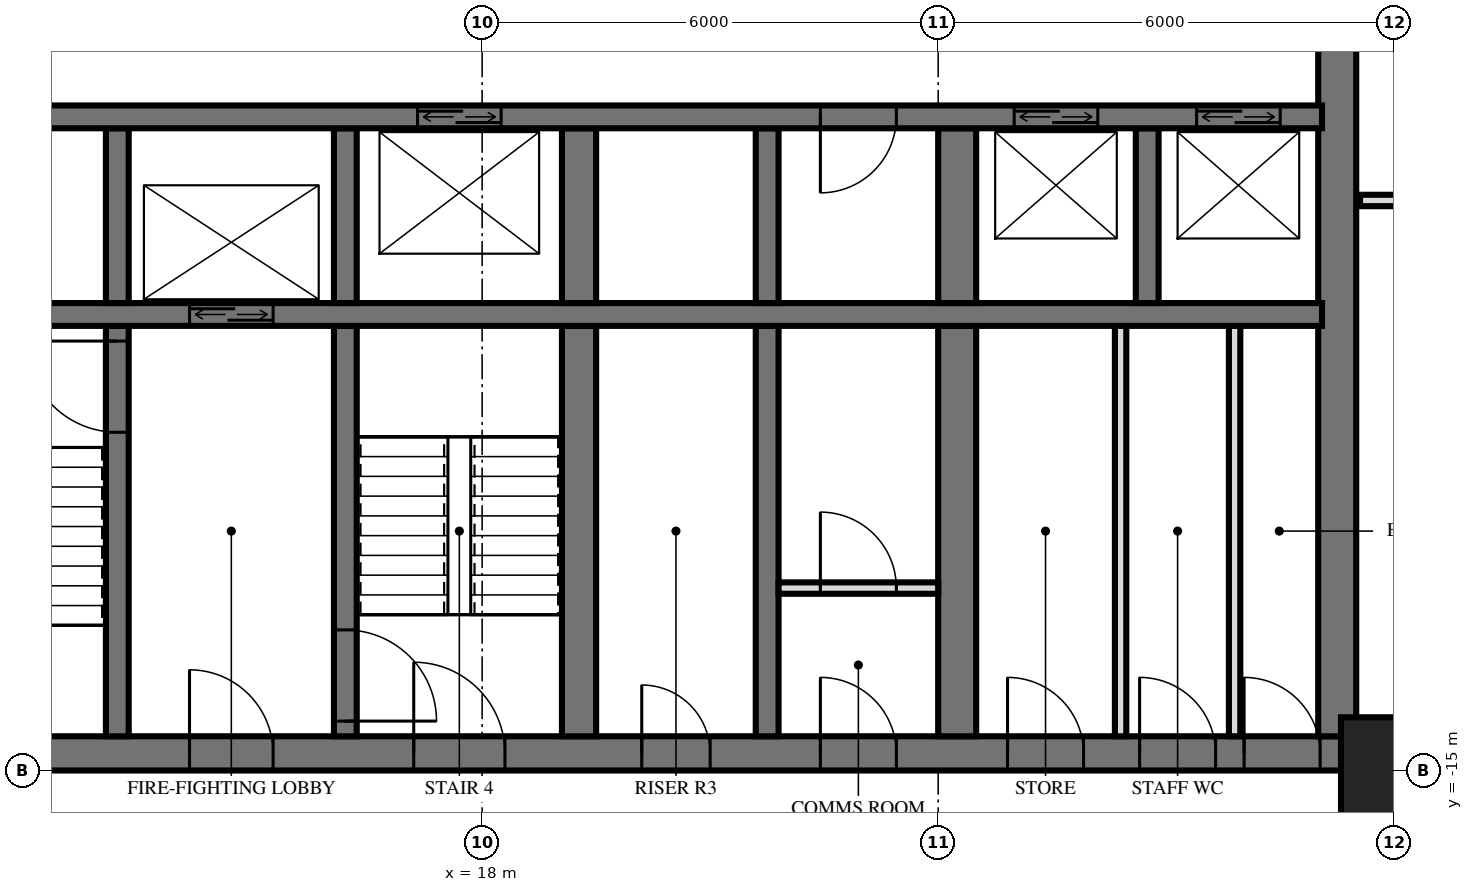
"""IFC4 building model, lengths in metres.
Left out: names, types, materials, properties, quantities, classifications, styles, units other than length and angle.
Written with IfcOpenShell. Run it as: python <this file> out.ifc"""

import sys

from ifc_helpers import new_model, si_unit, direction, frame, frame_2d, origin, origin_2d, place, context, subcontext, project, spatial, rectangle, extrude, element, fill, save


model = new_model("IFC4")
c1 = context("Model", 3, precision=1e-05, world=origin(), true_north=direction((0.0, 1.0)))
c2 = subcontext(c1, "Body", "Model", "MODEL_VIEW")
j1 = project(units=[si_unit("LENGTHUNIT", "METRE"), si_unit("PLANEANGLEUNIT", "RADIAN")], contexts=[c1])
p1 = place(None, origin())
s1 = spatial("IfcSite", under=j1, at=p1, CompositionType="ELEMENT")
p2 = place(p1, origin())
s2 = spatial("IfcBuilding", under=s1, at=p2, CompositionType="ELEMENT")
p3 = place(p2, frame((0.0, 0.0, 88.8)))
s3 = spatial("IfcBuildingStorey", under=s2, at=p3, CompositionType="ELEMENT", Elevation=88.8)
p4 = place(p3, frame((30.0, -15.0, 0.0), z_axis=(0.0, 0.0, 1.0), x_axis=(1.0, 0.0, 0.0)))
e1 = element("IfcColumn", 1, at=p4, inside=s3, PredefinedType="COLUMN", context=c2, shape_type="SweptSolid", body=[
    extrude(rectangle(XDim=1.4, YDim=1.4, at=origin_2d()), origin(), (0.0, 0.0, 1.0), 3.6),
])
p5 = place(p3, frame((10.0, -14.775, 0.0), z_axis=(0.0, 0.0, 1.0), x_axis=(1.0, 0.0, 0.0)))
e2 = element("IfcWall", 2, at=p5, inside=s3, PredefinedType="SHEAR", context=c2, shape_type="SweptSolid", body=[
    extrude(rectangle(XDim=19.5, YDim=0.45, at=frame_2d((9.75, 0.0))), origin(), (0.0, 0.0, 1.0), 3.6),
])
p6 = place(p5, frame((7.1, 0.0, 0.0)))
e3 = element("IfcOpeningElement", 3, at=p6, cuts=e2, PredefinedType="OPENING", context=c2, shape_type="SweptSolid", body=[
    extrude(rectangle(XDim=1.2, YDim=2.1, at=frame_2d((0.6, 1.05))), frame((0.0, 0.235, 0.0), z_axis=(0.0, -1.0, 0.0), x_axis=(1.0, 0.0, 0.0)), (0.0, 0.0, 1.0), 0.47),
])
p7 = place(p5, frame((4.15, 0.0, 0.0)))
e4 = element("IfcOpeningElement", 4, at=p7, cuts=e2, PredefinedType="OPENING", context=c2, shape_type="SweptSolid", body=[
    extrude(rectangle(XDim=1.1, YDim=2.1, at=frame_2d((0.55, 1.05))), frame((0.0, 0.235, 0.0), z_axis=(0.0, -1.0, 0.0), x_axis=(1.0, 0.0, 0.0)), (0.0, 0.0, 1.0), 0.47),
])
p8 = place(p5, frame((10.1, 0.0, 0.0)))
e5 = element("IfcOpeningElement", 5, at=p8, cuts=e2, PredefinedType="OPENING", context=c2, shape_type="SweptSolid", body=[
    extrude(rectangle(XDim=0.9, YDim=2.1, at=frame_2d((0.45, 1.05))), frame((0.0, 0.235, 0.0), z_axis=(0.0, -1.0, 0.0), x_axis=(1.0, 0.0, 0.0)), (0.0, 0.0, 1.0), 0.47),
])
p9 = place(p5, frame((12.45, 0.0, 0.0)))
e6 = element("IfcOpeningElement", 6, at=p9, cuts=e2, PredefinedType="OPENING", context=c2, shape_type="SweptSolid", body=[
    extrude(rectangle(XDim=1.0, YDim=2.1, at=frame_2d((0.5, 1.05))), frame((0.0, 0.235, 0.0), z_axis=(0.0, -1.0, 0.0), x_axis=(1.0, 0.0, 0.0)), (0.0, 0.0, 1.0), 0.47),
])
p10 = place(p5, frame((14.913, 0.0, 0.0)))
e7 = element("IfcOpeningElement", 7, at=p10, cuts=e2, PredefinedType="OPENING", context=c2, shape_type="SweptSolid", body=[
    extrude(rectangle(XDim=1.0, YDim=2.1, at=frame_2d((0.5, 1.05))), frame((0.0, 0.235, 0.0), z_axis=(0.0, -1.0, 0.0), x_axis=(1.0, 0.0, 0.0)), (0.0, 0.0, 1.0), 0.47),
])
p11 = place(p5, frame((16.65, 0.0, 0.0)))
e8 = element("IfcOpeningElement", 8, at=p11, cuts=e2, PredefinedType="OPENING", context=c2, shape_type="SweptSolid", body=[
    extrude(rectangle(XDim=1.0, YDim=2.1, at=frame_2d((0.5, 1.05))), frame((0.0, 0.235, 0.0), z_axis=(0.0, -1.0, 0.0), x_axis=(1.0, 0.0, 0.0)), (0.0, 0.0, 1.0), 0.47),
])
p12 = place(p5, frame((18.025, 0.0, 0.0)))
e9 = element("IfcOpeningElement", 9, at=p12, cuts=e2, PredefinedType="OPENING", context=c2, shape_type="SweptSolid", body=[
    extrude(rectangle(XDim=1.0, YDim=2.1, at=frame_2d((0.5, 1.05))), frame((0.0, 0.235, 0.0), z_axis=(0.0, -1.0, 0.0), x_axis=(1.0, 0.0, 0.0)), (0.0, 0.0, 1.0), 0.47),
])
p13 = place(p3, frame((29.25, -14.55, 0.0), z_axis=(0.0, 0.0, 1.0), x_axis=(0.0, 1.0, 0.0)))
e10 = element("IfcWall", 10, at=p13, inside=s3, PredefinedType="SHEAR", context=c2, shape_type="SweptSolid", body=[
    extrude(rectangle(XDim=14.1, YDim=0.5, at=frame_2d((7.05, 0.0))), origin(), (0.0, 0.0, 1.0), 3.6),
])
p14 = place(p3, frame((10.35, -6.4, 0.0), z_axis=(0.0, 0.0, 1.0), x_axis=(1.0, 0.0, 0.0)))
e11 = element("IfcWall", 11, at=p14, inside=s3, PredefinedType="SHEAR", context=c2, shape_type="SweptSolid", body=[
    extrude(rectangle(XDim=18.7, YDim=0.3, at=frame_2d((9.35, 0.0))), origin(), (0.0, 0.0, 1.0), 3.6),
])
p15 = place(p14, frame((14.65, 0.0, 0.0)))
e12 = element("IfcOpeningElement", 12, at=p15, cuts=e11, PredefinedType="OPENING", context=c2, shape_type="SweptSolid", body=[
    extrude(rectangle(XDim=1.1, YDim=2.1, at=frame_2d((0.55, 1.05))), frame((0.0, 0.16, 0.0), z_axis=(0.0, -1.0, 0.0), x_axis=(1.0, 0.0, 0.0)), (0.0, 0.0, 1.0), 0.32),
])
p16 = place(p14, frame((17.05, 0.0, 0.0)))
e13 = element("IfcOpeningElement", 13, at=p16, cuts=e11, PredefinedType="OPENING", context=c2, shape_type="SweptSolid", body=[
    extrude(rectangle(XDim=1.1, YDim=2.1, at=frame_2d((0.55, 1.05))), frame((0.0, 0.16, 0.0), z_axis=(0.0, -1.0, 0.0), x_axis=(1.0, 0.0, 0.0)), (0.0, 0.0, 1.0), 0.32),
])
p17 = place(p14, frame((6.8, 0.0, 0.0)))
e14 = element("IfcOpeningElement", 14, at=p17, cuts=e11, PredefinedType="OPENING", context=c2, shape_type="SweptSolid", body=[
    extrude(rectangle(XDim=1.1, YDim=2.1, at=frame_2d((0.55, 1.05))), frame((0.0, 0.16, 0.0), z_axis=(0.0, -1.0, 0.0), x_axis=(1.0, 0.0, 0.0)), (0.0, 0.0, 1.0), 0.32),
])
p18 = place(p14, frame((12.1, 0.0, 0.0)))
e15 = element("IfcOpeningElement", 15, at=p18, cuts=e11, PredefinedType="OPENING", context=c2, shape_type="SweptSolid", body=[
    extrude(rectangle(XDim=1.0, YDim=2.1, at=frame_2d((0.5, 1.05))), frame((0.0, 0.16, 0.0), z_axis=(0.0, -1.0, 0.0), x_axis=(1.0, 0.0, 0.0)), (0.0, 0.0, 1.0), 0.32),
])
p19 = place(p3, frame((10.35, -9.0, 0.0), z_axis=(0.0, 0.0, 1.0), x_axis=(1.0, 0.0, 0.0)))
e16 = element("IfcWall", 16, at=p19, inside=s3, PredefinedType="SHEAR", context=c2, shape_type="SweptSolid", body=[
    extrude(rectangle(XDim=18.7, YDim=0.3, at=frame_2d((9.35, 0.0))), origin(), (0.0, 0.0, 1.0), 3.6),
])
p20 = place(p19, frame((3.8, 0.0, 0.0)))
e17 = element("IfcOpeningElement", 17, at=p20, cuts=e16, PredefinedType="OPENING", context=c2, shape_type="SweptSolid", body=[
    extrude(rectangle(XDim=1.1, YDim=2.1, at=frame_2d((0.55, 1.05))), frame((0.0, 0.16, 0.0), z_axis=(0.0, -1.0, 0.0), x_axis=(1.0, 0.0, 0.0)), (0.0, 0.0, 1.0), 0.32),
])
p21 = place(p3, frame((13.2, -8.85, 0.0), z_axis=(0.0, 0.0, 1.0), x_axis=(0.0, 1.0, 0.0)))
e18 = element("IfcWall", 18, at=p21, inside=s3, PredefinedType="SHEAR", context=c2, shape_type="SweptSolid", body=[
    extrude(rectangle(XDim=2.3, YDim=0.3, at=frame_2d((1.15, 0.0))), origin(), (0.0, 0.0, 1.0), 3.6),
])
p22 = place(p3, frame((13.2, -14.55, 0.0), z_axis=(0.0, 0.0, 1.0), x_axis=(0.0, 1.0, 0.0)))
e19 = element("IfcWall", 19, at=p22, inside=s3, PredefinedType="SHEAR", context=c2, shape_type="SweptSolid", body=[
    extrude(rectangle(XDim=5.4, YDim=0.3, at=frame_2d((2.7, 0.0))), origin(), (0.0, 0.0, 1.0), 3.6),
])
p23 = place(p22, frame((4.0, 0.0, 0.0)))
e20 = element("IfcOpeningElement", 20, at=p23, cuts=e19, PredefinedType="OPENING", context=c2, shape_type="SweptSolid", body=[
    extrude(rectangle(XDim=1.2, YDim=2.1, at=frame_2d((0.6, 1.05))), frame((0.0, 0.16, 0.0), z_axis=(0.0, -1.0, 0.0), x_axis=(1.0, 0.0, 0.0)), (0.0, 0.0, 1.0), 0.32),
])
p24 = place(p3, frame((16.2, -8.85, 0.0), z_axis=(0.0, 0.0, 1.0), x_axis=(0.0, 1.0, 0.0)))
e21 = element("IfcWall", 21, at=p24, inside=s3, PredefinedType="SHEAR", context=c2, shape_type="SweptSolid", body=[
    extrude(rectangle(XDim=2.3, YDim=0.3, at=frame_2d((1.15, 0.0))), origin(), (0.0, 0.0, 1.0), 3.6),
])
p25 = place(p3, frame((16.2, -14.55, 0.0), z_axis=(0.0, 0.0, 1.0), x_axis=(0.0, 1.0, 0.0)))
e22 = element("IfcWall", 22, at=p25, inside=s3, PredefinedType="SHEAR", context=c2, shape_type="SweptSolid", body=[
    extrude(rectangle(XDim=5.4, YDim=0.3, at=frame_2d((2.7, 0.0))), origin(), (0.0, 0.0, 1.0), 3.6),
])
p26 = place(p25, frame((0.2, 0.0, 0.0)))
e23 = element("IfcOpeningElement", 23, at=p26, cuts=e22, PredefinedType="OPENING", context=c2, shape_type="SweptSolid", body=[
    extrude(rectangle(XDim=1.2, YDim=2.1, at=frame_2d((0.6, 1.05))), frame((0.0, 0.16, 0.0), z_axis=(0.0, -1.0, 0.0), x_axis=(1.0, 0.0, 0.0)), (0.0, 0.0, 1.0), 0.32),
])
p27 = place(p3, frame((19.275, -8.85, 0.0), z_axis=(0.0, 0.0, 1.0), x_axis=(0.0, 1.0, 0.0)))
e24 = element("IfcWall", 24, at=p27, inside=s3, PredefinedType="SHEAR", context=c2, shape_type="SweptSolid", body=[
    extrude(rectangle(XDim=2.3, YDim=0.45, at=frame_2d((1.15, 0.0))), origin(), (0.0, 0.0, 1.0), 3.6),
])
p28 = place(p3, frame((19.275, -14.55, 0.0), z_axis=(0.0, 0.0, 1.0), x_axis=(0.0, 1.0, 0.0)))
e25 = element("IfcWall", 25, at=p28, inside=s3, PredefinedType="SHEAR", context=c2, shape_type="SweptSolid", body=[
    extrude(rectangle(XDim=5.4, YDim=0.45, at=frame_2d((2.7, 0.0))), origin(), (0.0, 0.0, 1.0), 3.6),
])
p29 = place(p3, frame((21.75, -8.85, 0.0), z_axis=(0.0, 0.0, 1.0), x_axis=(0.0, 1.0, 0.0)))
e26 = element("IfcWall", 26, at=p29, inside=s3, PredefinedType="SHEAR", context=c2, shape_type="SweptSolid", body=[
    extrude(rectangle(XDim=2.3, YDim=0.3, at=frame_2d((1.15, 0.0))), origin(), (0.0, 0.0, 1.0), 3.6),
])
p30 = place(p3, frame((21.75, -14.55, 0.0), z_axis=(0.0, 0.0, 1.0), x_axis=(0.0, 1.0, 0.0)))
e27 = element("IfcWall", 27, at=p30, inside=s3, PredefinedType="SHEAR", context=c2, shape_type="SweptSolid", body=[
    extrude(rectangle(XDim=5.4, YDim=0.3, at=frame_2d((2.7, 0.0))), origin(), (0.0, 0.0, 1.0), 3.6),
])
p31 = place(p3, frame((24.25, -8.85, 0.0), z_axis=(0.0, 0.0, 1.0), x_axis=(0.0, 1.0, 0.0)))
e28 = element("IfcWall", 28, at=p31, inside=s3, PredefinedType="SHEAR", context=c2, shape_type="SweptSolid", body=[
    extrude(rectangle(XDim=2.3, YDim=0.5, at=frame_2d((1.15, 0.0))), origin(), (0.0, 0.0, 1.0), 3.6),
])
p32 = place(p3, frame((24.25, -14.55, 0.0), z_axis=(0.0, 0.0, 1.0), x_axis=(0.0, 1.0, 0.0)))
e29 = element("IfcWall", 29, at=p32, inside=s3, PredefinedType="SHEAR", context=c2, shape_type="SweptSolid", body=[
    extrude(rectangle(XDim=5.4, YDim=0.5, at=frame_2d((2.7, 0.0))), origin(), (0.0, 0.0, 1.0), 3.6),
])
p33 = place(p3, frame((26.75, -8.85, 0.0), z_axis=(0.0, 0.0, 1.0), x_axis=(0.0, 1.0, 0.0)))
e30 = element("IfcWall", 30, at=p33, inside=s3, PredefinedType="SHEAR", context=c2, shape_type="SweptSolid", body=[
    extrude(rectangle(XDim=2.3, YDim=0.3, at=frame_2d((1.15, 0.0))), origin(), (0.0, 0.0, 1.0), 3.6),
])
p34 = place(p3, frame((21.9, -12.6, 0.0), z_axis=(0.0, 0.0, 1.0), x_axis=(1.0, 0.0, 0.0)))
e31 = element("IfcWall", 31, at=p34, inside=s3, PredefinedType="PARTITIONING", context=c2, shape_type="SweptSolid", body=[
    extrude(rectangle(XDim=2.1, YDim=0.15, at=frame_2d((1.05, 0.0))), origin(), (0.0, 0.0, 1.0), 3.3),
])
p35 = place(p34, frame((0.55, 0.0, 0.0)))
e32 = element("IfcOpeningElement", 32, at=p35, cuts=e31, PredefinedType="OPENING", context=c2, shape_type="SweptSolid", body=[
    extrude(rectangle(XDim=1.0, YDim=2.1, at=frame_2d((0.5, 1.05))), frame((0.0, 0.085, 0.0), z_axis=(0.0, -1.0, 0.0), x_axis=(1.0, 0.0, 0.0)), (0.0, 0.0, 1.0), 0.17),
])
for number, where, z_axis, x_axis in (
    (33, (26.4, -14.55, 0.0), (0.0, 0.0, 1.0), (0.0, 1.0, 0.0)),
    (34, (27.9, -14.55, 0.0), (0.0, 0.0, 1.0), (0.0, 1.0, 0.0)),
):
    element("IfcWall", number, at=place(p3, frame(where, z_axis=z_axis, x_axis=x_axis)), inside=s3, PredefinedType="PARTITIONING", context=c2, shape_type="SweptSolid", body=[
        extrude(rectangle(XDim=5.4, YDim=0.15, at=frame_2d((2.7, 0.0))), origin(), (0.0, 0.0, 1.0), 3.3),
    ])
p36 = place(p3, frame((29.55, -15.0, 0.0), z_axis=(0.0, 0.0, 1.0), x_axis=(1.0, 0.0, 0.0)))
e35 = element("IfcWall", 35, at=p36, inside=s3, PredefinedType="PARTITIONING", context=c2, shape_type="SweptSolid", body=[
    extrude(rectangle(XDim=3.57, YDim=0.15, at=frame_2d((1.785, 0.0))), origin(), (0.0, 0.0, 1.0), 3.32),
])
p37 = place(p36, frame((1.205, 0.0, 0.0)))
e36 = element("IfcOpeningElement", 36, at=p37, cuts=e35, PredefinedType="OPENING", context=c2, shape_type="SweptSolid", body=[
    extrude(rectangle(XDim=0.8, YDim=2.1, at=frame_2d((0.4, 1.05))), frame((0.0, 0.085, 0.0), z_axis=(0.0, -1.0, 0.0), x_axis=(1.0, 0.0, 0.0)), (0.0, 0.0, 1.0), 0.17),
])
p38 = place(p3, frame((29.55, -7.5, 0.0), z_axis=(0.0, 0.0, 1.0), x_axis=(1.0, 0.0, 0.0)))
e37 = element("IfcWall", 37, at=p38, inside=s3, PredefinedType="PARTITIONING", context=c2, shape_type="SweptSolid", body=[
    extrude(rectangle(XDim=3.57, YDim=0.15, at=frame_2d((1.785, 0.0))), origin(), (0.0, 0.0, 1.0), 3.32),
])
p39 = place(p38, frame((1.4, 0.0, 0.0)))
e38 = element("IfcOpeningElement", 38, at=p39, cuts=e37, PredefinedType="OPENING", context=c2, shape_type="SweptSolid", body=[
    extrude(rectangle(XDim=0.9, YDim=2.1, at=frame_2d((0.45, 1.05))), frame((0.0, 0.085, 0.0), z_axis=(0.0, -1.0, 0.0), x_axis=(1.0, 0.0, 0.0)), (0.0, 0.0, 1.0), 0.17),
])
p40 = place(p15, origin())
e39 = element("IfcDoor", 39, at=p40, inside=s3, OperationType="DOUBLE_DOOR_SLIDING", PredefinedType="USERDEFINED", context=c2, shape_type="SweptSolid", body=[
    extrude(rectangle(XDim=1.1, YDim=2.1, at=frame_2d((0.55, 1.05))), frame((0.0, 0.025, 0.0), z_axis=(0.0, -1.0, 0.0), x_axis=(1.0, 0.0, 0.0)), (0.0, 0.0, 1.0), 0.05),
])
fill(e12, e39)
p41 = place(p16, origin())
e40 = element("IfcDoor", 40, at=p41, inside=s3, OperationType="DOUBLE_DOOR_SLIDING", PredefinedType="USERDEFINED", context=c2, shape_type="SweptSolid", body=[
    extrude(rectangle(XDim=1.1, YDim=2.1, at=frame_2d((0.55, 1.05))), frame((0.0, 0.025, 0.0), z_axis=(0.0, -1.0, 0.0), x_axis=(1.0, 0.0, 0.0)), (0.0, 0.0, 1.0), 0.05),
])
fill(e13, e40)
p42 = place(p20, origin())
e41 = element("IfcDoor", 41, at=p42, inside=s3, OperationType="DOUBLE_DOOR_SLIDING", PredefinedType="USERDEFINED", context=c2, shape_type="SweptSolid", body=[
    extrude(rectangle(XDim=1.1, YDim=2.1, at=frame_2d((0.55, 1.05))), frame((0.0, 0.025, 0.0), z_axis=(0.0, -1.0, 0.0), x_axis=(1.0, 0.0, 0.0)), (0.0, 0.0, 1.0), 0.05),
])
fill(e17, e41)
p43 = place(p17, origin())
e42 = element("IfcDoor", 42, at=p43, inside=s3, OperationType="DOUBLE_DOOR_SLIDING", PredefinedType="USERDEFINED", context=c2, shape_type="SweptSolid", body=[
    extrude(rectangle(XDim=1.1, YDim=2.1, at=frame_2d((0.55, 1.05))), frame((0.0, 0.025, 0.0), z_axis=(0.0, -1.0, 0.0), x_axis=(1.0, 0.0, 0.0)), (0.0, 0.0, 1.0), 0.05),
])
fill(e14, e42)
p44 = place(p6, origin())
e43 = element("IfcDoor", 43, at=p44, inside=s3, OperationType="SINGLE_SWING_RIGHT", PredefinedType="DOOR", context=c2, shape_type="SweptSolid", body=[
    extrude(rectangle(XDim=1.2, YDim=2.1, at=frame_2d((0.6, 1.05))), frame((0.0, 0.025, 0.0), z_axis=(0.0, -1.0, 0.0), x_axis=(1.0, 0.0, 0.0)), (0.0, 0.0, 1.0), 0.05),
])
fill(e3, e43)
p45 = place(p7, origin())
e44 = element("IfcDoor", 44, at=p45, inside=s3, OperationType="SINGLE_SWING_RIGHT", PredefinedType="DOOR", context=c2, shape_type="SweptSolid", body=[
    extrude(rectangle(XDim=1.1, YDim=2.1, at=frame_2d((0.55, 1.05))), frame((0.0, 0.025, 0.0), z_axis=(0.0, -1.0, 0.0), x_axis=(1.0, 0.0, 0.0)), (0.0, 0.0, 1.0), 0.05),
])
fill(e4, e44)
p46 = place(p8, origin())
e45 = element("IfcDoor", 45, at=p46, inside=s3, OperationType="SINGLE_SWING_RIGHT", PredefinedType="DOOR", context=c2, shape_type="SweptSolid", body=[
    extrude(rectangle(XDim=0.9, YDim=2.1, at=frame_2d((0.45, 1.05))), frame((0.0, 0.025, 0.0), z_axis=(0.0, -1.0, 0.0), x_axis=(1.0, 0.0, 0.0)), (0.0, 0.0, 1.0), 0.05),
])
fill(e5, e45)
p47 = place(p9, origin())
e46 = element("IfcDoor", 46, at=p47, inside=s3, OperationType="SINGLE_SWING_RIGHT", PredefinedType="DOOR", context=c2, shape_type="SweptSolid", body=[
    extrude(rectangle(XDim=1.0, YDim=2.1, at=frame_2d((0.5, 1.05))), frame((0.0, 0.025, 0.0), z_axis=(0.0, -1.0, 0.0), x_axis=(1.0, 0.0, 0.0)), (0.0, 0.0, 1.0), 0.05),
])
fill(e6, e46)
p48 = place(p10, origin())
e47 = element("IfcDoor", 47, at=p48, inside=s3, OperationType="SINGLE_SWING_RIGHT", PredefinedType="DOOR", context=c2, shape_type="SweptSolid", body=[
    extrude(rectangle(XDim=1.0, YDim=2.1, at=frame_2d((0.5, 1.05))), frame((0.0, 0.025, 0.0), z_axis=(0.0, -1.0, 0.0), x_axis=(1.0, 0.0, 0.0)), (0.0, 0.0, 1.0), 0.05),
])
fill(e7, e47)
p49 = place(p11, origin())
e48 = element("IfcDoor", 48, at=p49, inside=s3, OperationType="SINGLE_SWING_RIGHT", PredefinedType="DOOR", context=c2, shape_type="SweptSolid", body=[
    extrude(rectangle(XDim=1.0, YDim=2.1, at=frame_2d((0.5, 1.05))), frame((0.0, 0.025, 0.0), z_axis=(0.0, -1.0, 0.0), x_axis=(1.0, 0.0, 0.0)), (0.0, 0.0, 1.0), 0.05),
])
fill(e8, e48)
p50 = place(p12, origin())
e49 = element("IfcDoor", 49, at=p50, inside=s3, OperationType="SINGLE_SWING_RIGHT", PredefinedType="DOOR", context=c2, shape_type="SweptSolid", body=[
    extrude(rectangle(XDim=1.0, YDim=2.1, at=frame_2d((0.5, 1.05))), frame((0.0, 0.025, 0.0), z_axis=(0.0, -1.0, 0.0), x_axis=(1.0, 0.0, 0.0)), (0.0, 0.0, 1.0), 0.05),
])
fill(e9, e49)
p51 = place(p18, frame((0.5, 0.0, 0.0), z_axis=(0.0, 0.0, 1.0), x_axis=(-1.0, 0.0, 0.0)))
e50 = element("IfcDoor", 50, at=p51, inside=s3, OperationType="SINGLE_SWING_LEFT", PredefinedType="DOOR", context=c2, shape_type="SweptSolid", body=[
    extrude(rectangle(XDim=1.0, YDim=2.1, at=frame_2d((0.0, 1.05))), frame((0.0, -0.025, 0.0), z_axis=(0.0, 1.0, 0.0), x_axis=(-1.0, 0.0, 0.0)), (0.0, 0.0, 1.0), 0.05),
])
fill(e15, e50)
p52 = place(p23, origin())
e51 = element("IfcDoor", 51, at=p52, inside=s3, OperationType="SINGLE_SWING_LEFT", PredefinedType="DOOR", context=c2, shape_type="SweptSolid", body=[
    extrude(rectangle(XDim=1.2, YDim=2.1, at=frame_2d((0.6, 1.05))), frame((0.0, 0.025, 0.0), z_axis=(0.0, -1.0, 0.0), x_axis=(1.0, 0.0, 0.0)), (0.0, 0.0, 1.0), 0.05),
])
fill(e20, e51)
p53 = place(p26, frame((0.6, 0.0, 0.0), z_axis=(0.0, 0.0, 1.0), x_axis=(-1.0, 0.0, 0.0)))
e52 = element("IfcDoor", 52, at=p53, inside=s3, OperationType="SINGLE_SWING_LEFT", PredefinedType="DOOR", context=c2, shape_type="SweptSolid", body=[
    extrude(rectangle(XDim=1.2, YDim=2.1, at=frame_2d((0.0, 1.05))), frame((0.0, -0.025, 0.0), z_axis=(0.0, 1.0, 0.0), x_axis=(-1.0, 0.0, 0.0)), (0.0, 0.0, 1.0), 0.05),
])
fill(e23, e52)
p54 = place(p35, origin())
e53 = element("IfcDoor", 53, at=p54, inside=s3, OperationType="SINGLE_SWING_RIGHT", PredefinedType="DOOR", context=c2, shape_type="SweptSolid", body=[
    extrude(rectangle(XDim=1.0, YDim=2.1, at=frame_2d((0.5, 1.05))), frame((0.0, 0.025, 0.0), z_axis=(0.0, -1.0, 0.0), x_axis=(1.0, 0.0, 0.0)), (0.0, 0.0, 1.0), 0.05),
])
fill(e32, e53)
save(model, sys.argv[1])
